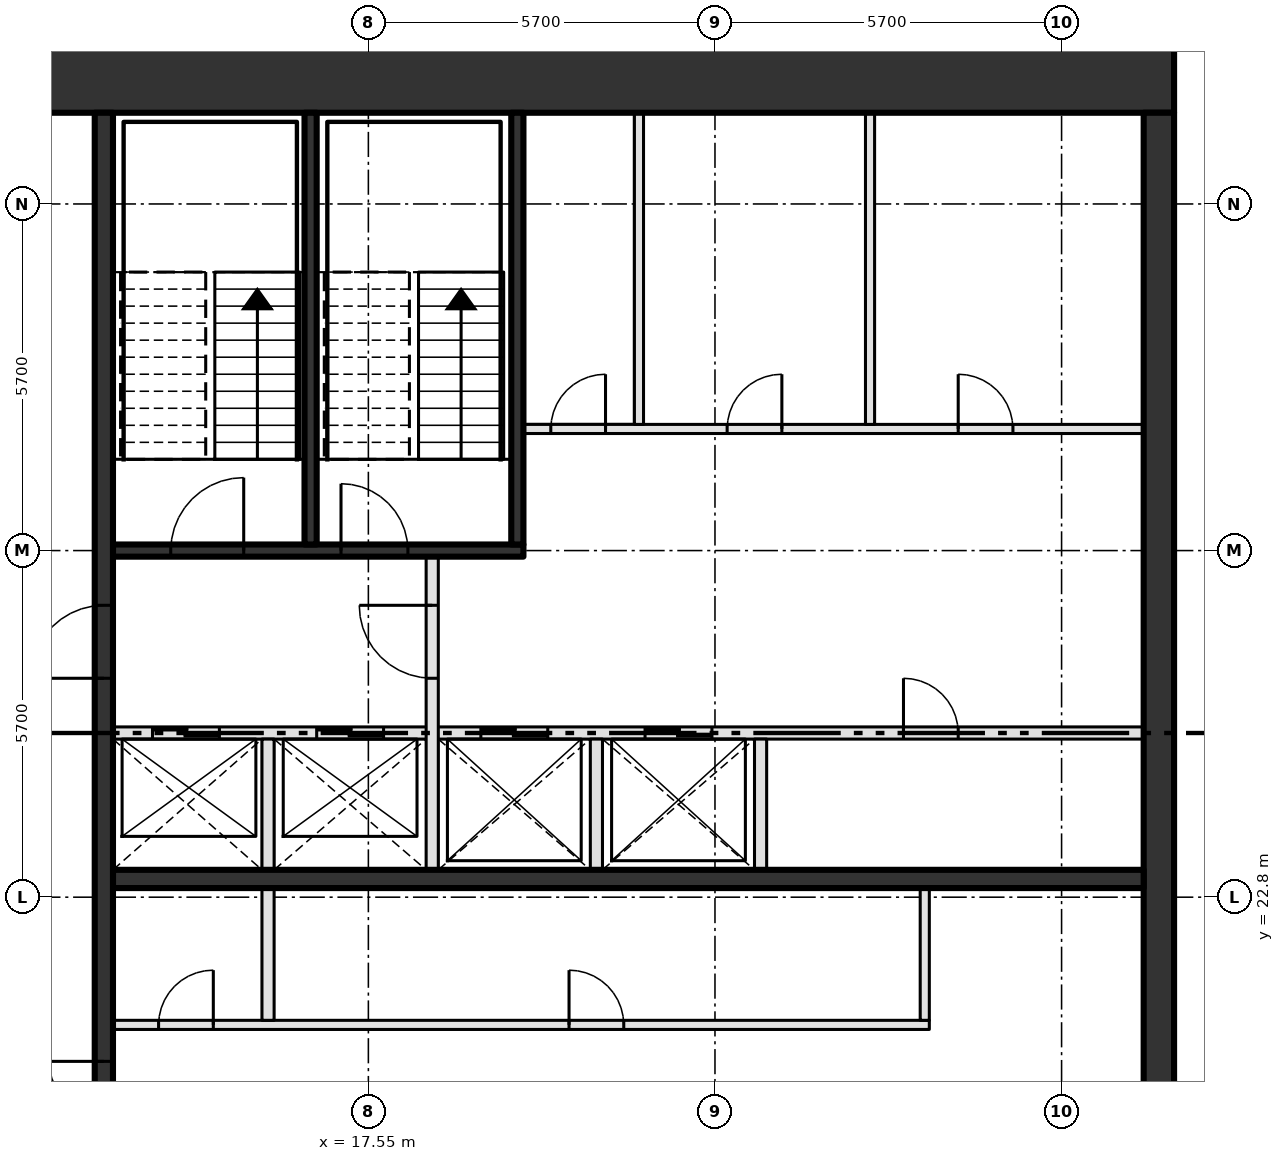
"""IFC4 building model, lengths in metres.
Left out: names, types, materials, properties, quantities, classifications, styles, units other than length and angle.
Written with IfcOpenShell. Run it as: python <this file> out.ifc"""

import sys

from ifc_helpers import new_model, si_unit, direction, frame, frame_2d, origin, place, context, subcontext, project, spatial, rectangle, extrude, element, fill, save


model = new_model("IFC4")
c1 = context("Model", 3, precision=1e-05, world=origin(), true_north=direction((0.0, 1.0)))
c2 = subcontext(c1, "Body", "Model", "MODEL_VIEW")
j1 = project(units=[si_unit("LENGTHUNIT", "METRE"), si_unit("PLANEANGLEUNIT", "RADIAN")], contexts=[c1])
p1 = place(None, origin())
s1 = spatial("IfcSite", under=j1, at=p1, CompositionType="ELEMENT")
p2 = place(p1, origin())
s2 = spatial("IfcBuilding", under=s1, at=p2, CompositionType="ELEMENT")
p3 = place(p2, frame((0.0, 0.0, 396.0)))
s3 = spatial("IfcBuildingStorey", under=s2, at=p3, CompositionType="ELEMENT", Elevation=396.0)
p4 = place(p3, frame((8.0, 36.3, -0.3), z_axis=(0.0, 0.0, 1.0), x_axis=(1.0, 0.0, 0.0)))
e1 = element("IfcWall", 1, at=p4, inside=s3, PredefinedType="SHEAR", context=c2, shape_type="SweptSolid", body=[
    extrude(rectangle(XDim=22.8, YDim=1.2, at=frame_2d((11.4, 0.0))), origin(), (0.0, 0.0, 1.0), 4.05),
])
p5 = place(p4, frame((2.3, 0.0, 0.3)))
e2 = element("IfcOpeningElement", 2, at=p5, cuts=e1, PredefinedType="OPENING", context=c2, shape_type="SweptSolid", body=[
    extrude(rectangle(XDim=1.8, YDim=2.1, at=frame_2d((0.9, 1.05))), frame((0.0, 0.61, 0.0), z_axis=(0.0, -1.0, 0.0), x_axis=(1.0, 0.0, 0.0)), (0.0, 0.0, 1.0), 1.22),
])
p6 = place(p3, frame((30.55, 14.6, -0.3), z_axis=(0.0, 0.0, 1.0), x_axis=(0.0, 1.0, 0.0)))
e3 = element("IfcWall", 3, at=p6, inside=s3, PredefinedType="SHEAR", context=c2, shape_type="SweptSolid", body=[
    extrude(rectangle(XDim=21.1, YDim=0.5, at=frame_2d((10.55, 0.0))), origin(), (0.0, 0.0, 1.0), 4.05),
])
p7 = place(p3, frame((13.35, 20.7, 0.0), z_axis=(0.0, 0.0, 1.0), x_axis=(1.0, 0.0, 0.0)))
e4 = element("IfcWall", 4, at=p7, inside=s3, PredefinedType="PARTITIONING", context=c2, shape_type="SweptSolid", body=[
    extrude(rectangle(XDim=13.425, YDim=0.15, at=frame_2d((6.712, 0.0))), origin(), (0.0, 0.0, 1.0), 3.75),
])
p8 = place(p7, frame((0.75, 0.0, 0.0)))
e5 = element("IfcOpeningElement", 5, at=p8, cuts=e4, PredefinedType="OPENING", context=c2, shape_type="SweptSolid", body=[
    extrude(rectangle(XDim=0.9, YDim=2.1, at=frame_2d((0.45, 1.05))), frame((0.0, 0.085, 0.0), z_axis=(0.0, -1.0, 0.0), x_axis=(1.0, 0.0, 0.0)), (0.0, 0.0, 1.0), 0.17),
])
p9 = place(p7, frame((7.5, 0.0, 0.0)))
e6 = element("IfcOpeningElement", 6, at=p9, cuts=e4, PredefinedType="OPENING", context=c2, shape_type="SweptSolid", body=[
    extrude(rectangle(XDim=0.9, YDim=2.1, at=frame_2d((0.45, 1.05))), frame((0.0, 0.085, 0.0), z_axis=(0.0, -1.0, 0.0), x_axis=(1.0, 0.0, 0.0)), (0.0, 0.0, 1.0), 0.17),
])
p10 = place(p3, frame((13.35, 23.1, 0.0), z_axis=(0.0, 0.0, 1.0), x_axis=(1.0, 0.0, 0.0)))
e7 = element("IfcWall", 7, at=p10, inside=s3, PredefinedType="SHEAR", context=c2, shape_type="SweptSolid", body=[
    extrude(rectangle(XDim=16.95, YDim=0.3, at=frame_2d((8.475, 0.0))), origin(), (0.0, 0.0, 1.0), 3.75),
])
p11 = place(p3, frame((13.35, 25.5, 0.0), z_axis=(0.0, 0.0, 1.0), x_axis=(1.0, 0.0, 0.0)))
e8 = element("IfcWall", 8, at=p11, inside=s3, PredefinedType="SOLIDWALL", context=c2, shape_type="SweptSolid", body=[
    extrude(rectangle(XDim=16.95, YDim=0.2, at=frame_2d((8.475, 0.0))), origin(), (0.0, 0.0, 1.0), 3.75),
])
p12 = place(p11, frame((0.65, 0.0, 0.0)))
e9 = element("IfcOpeningElement", 9, at=p12, cuts=e8, PredefinedType="OPENING", context=c2, shape_type="SweptSolid", body=[
    extrude(rectangle(XDim=1.1, YDim=2.1, at=frame_2d((0.55, 1.05))), frame((0.0, 0.11, 0.0), z_axis=(0.0, -1.0, 0.0), x_axis=(1.0, 0.0, 0.0)), (0.0, 0.0, 1.0), 0.22),
])
p13 = place(p11, frame((3.35, 0.0, 0.0)))
e10 = element("IfcOpeningElement", 10, at=p13, cuts=e8, PredefinedType="OPENING", context=c2, shape_type="SweptSolid", body=[
    extrude(rectangle(XDim=1.1, YDim=2.1, at=frame_2d((0.55, 1.05))), frame((0.0, 0.11, 0.0), z_axis=(0.0, -1.0, 0.0), x_axis=(1.0, 0.0, 0.0)), (0.0, 0.0, 1.0), 0.22),
])
p14 = place(p11, frame((6.05, 0.0, 0.0)))
e11 = element("IfcOpeningElement", 11, at=p14, cuts=e8, PredefinedType="OPENING", context=c2, shape_type="SweptSolid", body=[
    extrude(rectangle(XDim=1.1, YDim=2.1, at=frame_2d((0.55, 1.05))), frame((0.0, 0.11, 0.0), z_axis=(0.0, -1.0, 0.0), x_axis=(1.0, 0.0, 0.0)), (0.0, 0.0, 1.0), 0.22),
])
p15 = place(p11, frame((8.75, 0.0, 0.0)))
e12 = element("IfcOpeningElement", 12, at=p15, cuts=e8, PredefinedType="OPENING", context=c2, shape_type="SweptSolid", body=[
    extrude(rectangle(XDim=1.1, YDim=2.1, at=frame_2d((0.55, 1.05))), frame((0.0, 0.11, 0.0), z_axis=(0.0, -1.0, 0.0), x_axis=(1.0, 0.0, 0.0)), (0.0, 0.0, 1.0), 0.22),
])
p16 = place(p11, frame((13.0, 0.0, 0.0)))
e13 = element("IfcOpeningElement", 13, at=p16, cuts=e8, PredefinedType="OPENING", context=c2, shape_type="SweptSolid", body=[
    extrude(rectangle(XDim=0.9, YDim=2.1, at=frame_2d((0.45, 1.05))), frame((0.0, 0.11, 0.0), z_axis=(0.0, -1.0, 0.0), x_axis=(1.0, 0.0, 0.0)), (0.0, 0.0, 1.0), 0.22),
])
p17 = place(p3, frame((13.35, 28.5, 0.0), z_axis=(0.0, 0.0, 1.0), x_axis=(1.0, 0.0, 0.0)))
e14 = element("IfcWall", 14, at=p17, inside=s3, PredefinedType="SOLIDWALL", context=c2, shape_type="SweptSolid", body=[
    extrude(rectangle(XDim=6.75, YDim=0.2, at=frame_2d((3.375, 0.0))), origin(), (0.0, 0.0, 1.0), 3.75),
])
p18 = place(p17, frame((0.95, 0.0, 0.0)))
e15 = element("IfcOpeningElement", 15, at=p18, cuts=e14, PredefinedType="OPENING", context=c2, shape_type="SweptSolid", body=[
    extrude(rectangle(XDim=1.2, YDim=2.1, at=frame_2d((0.6, 1.05))), frame((0.0, 0.11, 0.0), z_axis=(0.0, -1.0, 0.0), x_axis=(1.0, 0.0, 0.0)), (0.0, 0.0, 1.0), 0.22),
])
p19 = place(p17, frame((3.75, 0.0, 0.0)))
e16 = element("IfcOpeningElement", 16, at=p19, cuts=e14, PredefinedType="OPENING", context=c2, shape_type="SweptSolid", body=[
    extrude(rectangle(XDim=1.1, YDim=2.1, at=frame_2d((0.55, 1.05))), frame((0.0, 0.11, 0.0), z_axis=(0.0, -1.0, 0.0), x_axis=(1.0, 0.0, 0.0)), (0.0, 0.0, 1.0), 0.22),
])
p20 = place(p3, frame((20.1, 30.5, 0.0), z_axis=(0.0, 0.0, 1.0), x_axis=(1.0, 0.0, 0.0)))
e17 = element("IfcWall", 17, at=p20, inside=s3, PredefinedType="PARTITIONING", context=c2, shape_type="SweptSolid", body=[
    extrude(rectangle(XDim=10.2, YDim=0.15, at=frame_2d((5.1, 0.0))), origin(), (0.0, 0.0, 1.0), 3.75),
])
p21 = place(p20, frame((0.45, 0.0, 0.0)))
e18 = element("IfcOpeningElement", 18, at=p21, cuts=e17, PredefinedType="OPENING", context=c2, shape_type="SweptSolid", body=[
    extrude(rectangle(XDim=0.9, YDim=2.1, at=frame_2d((0.45, 1.05))), frame((0.0, 0.085, 0.0), z_axis=(0.0, -1.0, 0.0), x_axis=(1.0, 0.0, 0.0)), (0.0, 0.0, 1.0), 0.17),
])
p22 = place(p20, frame((3.35, 0.0, 0.0)))
e19 = element("IfcOpeningElement", 19, at=p22, cuts=e17, PredefinedType="OPENING", context=c2, shape_type="SweptSolid", body=[
    extrude(rectangle(XDim=0.9, YDim=2.1, at=frame_2d((0.45, 1.05))), frame((0.0, 0.085, 0.0), z_axis=(0.0, -1.0, 0.0), x_axis=(1.0, 0.0, 0.0)), (0.0, 0.0, 1.0), 0.17),
])
p23 = place(p20, frame((7.15, 0.0, 0.0)))
e20 = element("IfcOpeningElement", 20, at=p23, cuts=e17, PredefinedType="OPENING", context=c2, shape_type="SweptSolid", body=[
    extrude(rectangle(XDim=0.9, YDim=2.1, at=frame_2d((0.45, 1.05))), frame((0.0, 0.085, 0.0), z_axis=(0.0, -1.0, 0.0), x_axis=(1.0, 0.0, 0.0)), (0.0, 0.0, 1.0), 0.17),
])
p24 = place(p3, frame((13.2, 14.6, 0.0), z_axis=(0.0, 0.0, 1.0), x_axis=(0.0, 1.0, 0.0)))
e21 = element("IfcWall", 21, at=p24, inside=s3, PredefinedType="SHEAR", context=c2, shape_type="SweptSolid", body=[
    extrude(rectangle(XDim=21.1, YDim=0.3, at=frame_2d((10.55, 0.0))), origin(), (0.0, 0.0, 1.0), 3.75),
])
p25 = place(p24, frame((3.7, 0.0, 0.0)))
e22 = element("IfcOpeningElement", 22, at=p25, cuts=e21, PredefinedType="OPENING", context=c2, shape_type="SweptSolid", body=[
    extrude(rectangle(XDim=1.8, YDim=2.1, at=frame_2d((0.9, 1.05))), frame((0.0, 0.16, 0.0), z_axis=(0.0, -1.0, 0.0), x_axis=(1.0, 0.0, 0.0)), (0.0, 0.0, 1.0), 0.32),
])
p26 = place(p24, frame((11.8, 0.0, 0.0)))
e23 = element("IfcOpeningElement", 23, at=p26, cuts=e21, PredefinedType="OPENING", context=c2, shape_type="SweptSolid", body=[
    extrude(rectangle(XDim=1.2, YDim=2.1, at=frame_2d((0.6, 1.05))), frame((0.0, 0.16, 0.0), z_axis=(0.0, -1.0, 0.0), x_axis=(1.0, 0.0, 0.0)), (0.0, 0.0, 1.0), 0.32),
])
p27 = place(p3, frame((15.9, 20.775, 0.0), z_axis=(0.0, 0.0, 1.0), x_axis=(0.0, 1.0, 0.0)))
e24 = element("IfcWall", 24, at=p27, inside=s3, PredefinedType="SOLIDWALL", context=c2, shape_type="SweptSolid", body=[
    extrude(rectangle(XDim=4.625, YDim=0.2, at=frame_2d((2.312, 0.0))), origin(), (0.0, 0.0, 1.0), 3.75),
])
p28 = place(p3, frame((16.6, 28.6, 0.0), z_axis=(0.0, 0.0, 1.0), x_axis=(0.0, 1.0, 0.0)))
e25 = element("IfcWall", 25, at=p28, inside=s3, PredefinedType="SOLIDWALL", context=c2, shape_type="SweptSolid", body=[
    extrude(rectangle(XDim=7.1, YDim=0.2, at=frame_2d((3.55, 0.0))), origin(), (0.0, 0.0, 1.0), 3.75),
])
p29 = place(p3, frame((18.6, 23.25, 0.0), z_axis=(0.0, 0.0, 1.0), x_axis=(0.0, 1.0, 0.0)))
e26 = element("IfcWall", 26, at=p29, inside=s3, PredefinedType="SOLIDWALL", context=c2, shape_type="SweptSolid", body=[
    extrude(rectangle(XDim=5.15, YDim=0.2, at=frame_2d((2.575, 0.0))), origin(), (0.0, 0.0, 1.0), 3.75),
])
p30 = place(p29, frame((3.15, 0.0, 0.0)))
e27 = element("IfcOpeningElement", 27, at=p30, cuts=e26, PredefinedType="OPENING", context=c2, shape_type="SweptSolid", body=[
    extrude(rectangle(XDim=1.2, YDim=2.1, at=frame_2d((0.6, 1.05))), frame((0.0, 0.11, 0.0), z_axis=(0.0, -1.0, 0.0), x_axis=(1.0, 0.0, 0.0)), (0.0, 0.0, 1.0), 0.22),
])
p31 = place(p3, frame((20.0, 28.6, 0.0), z_axis=(0.0, 0.0, 1.0), x_axis=(0.0, 1.0, 0.0)))
e28 = element("IfcWall", 28, at=p31, inside=s3, PredefinedType="SOLIDWALL", context=c2, shape_type="SweptSolid", body=[
    extrude(rectangle(XDim=7.1, YDim=0.2, at=frame_2d((3.55, 0.0))), origin(), (0.0, 0.0, 1.0), 3.75),
])
p32 = place(p3, frame((21.3, 23.25, 0.0), z_axis=(0.0, 0.0, 1.0), x_axis=(0.0, 1.0, 0.0)))
e29 = element("IfcWall", 29, at=p32, inside=s3, PredefinedType="SOLIDWALL", context=c2, shape_type="SweptSolid", body=[
    extrude(rectangle(XDim=2.15, YDim=0.2, at=frame_2d((1.075, 0.0))), origin(), (0.0, 0.0, 1.0), 3.75),
])
p33 = place(p3, frame((22.0, 30.575, 0.0), z_axis=(0.0, 0.0, 1.0), x_axis=(0.0, 1.0, 0.0)))
e30 = element("IfcWall", 30, at=p33, inside=s3, PredefinedType="PARTITIONING", context=c2, shape_type="SweptSolid", body=[
    extrude(rectangle(XDim=5.125, YDim=0.15, at=frame_2d((2.562, 0.0))), origin(), (0.0, 0.0, 1.0), 3.75),
])
p34 = place(p3, frame((24.0, 23.25, 0.0), z_axis=(0.0, 0.0, 1.0), x_axis=(0.0, 1.0, 0.0)))
e31 = element("IfcWall", 31, at=p34, inside=s3, PredefinedType="SOLIDWALL", context=c2, shape_type="SweptSolid", body=[
    extrude(rectangle(XDim=2.15, YDim=0.2, at=frame_2d((1.075, 0.0))), origin(), (0.0, 0.0, 1.0), 3.75),
])
p35 = place(p3, frame((25.8, 30.575, 0.0), z_axis=(0.0, 0.0, 1.0), x_axis=(0.0, 1.0, 0.0)))
e32 = element("IfcWall", 32, at=p35, inside=s3, PredefinedType="PARTITIONING", context=c2, shape_type="SweptSolid", body=[
    extrude(rectangle(XDim=5.125, YDim=0.15, at=frame_2d((2.562, 0.0))), origin(), (0.0, 0.0, 1.0), 3.75),
])
p36 = place(p3, frame((26.7, 20.775, 0.0), z_axis=(0.0, 0.0, 1.0), x_axis=(0.0, 1.0, 0.0)))
e33 = element("IfcWall", 33, at=p36, inside=s3, PredefinedType="PARTITIONING", context=c2, shape_type="SweptSolid", body=[
    extrude(rectangle(XDim=2.175, YDim=0.15, at=frame_2d((1.087, 0.0))), origin(), (0.0, 0.0, 1.0), 3.75),
])
p37 = place(p12, origin())
e34 = element("IfcDoor", 34, at=p37, inside=s3, OperationType="SLIDING_TO_LEFT", PredefinedType="DOOR", context=c2, shape_type="SweptSolid", body=[
    extrude(rectangle(XDim=1.1, YDim=2.1, at=frame_2d((0.55, 1.05))), frame((0.0, 0.025, 0.0), z_axis=(0.0, -1.0, 0.0), x_axis=(1.0, 0.0, 0.0)), (0.0, 0.0, 1.0), 0.05),
])
fill(e9, e34)
p38 = place(p13, origin())
e35 = element("IfcDoor", 35, at=p38, inside=s3, OperationType="SLIDING_TO_LEFT", PredefinedType="DOOR", context=c2, shape_type="SweptSolid", body=[
    extrude(rectangle(XDim=1.1, YDim=2.1, at=frame_2d((0.55, 1.05))), frame((0.0, 0.025, 0.0), z_axis=(0.0, -1.0, 0.0), x_axis=(1.0, 0.0, 0.0)), (0.0, 0.0, 1.0), 0.05),
])
fill(e10, e35)
p39 = place(p14, origin())
e36 = element("IfcDoor", 36, at=p39, inside=s3, OperationType="SLIDING_TO_LEFT", PredefinedType="DOOR", context=c2, shape_type="SweptSolid", body=[
    extrude(rectangle(XDim=1.1, YDim=2.1, at=frame_2d((0.55, 1.05))), frame((0.0, 0.025, 0.0), z_axis=(0.0, -1.0, 0.0), x_axis=(1.0, 0.0, 0.0)), (0.0, 0.0, 1.0), 0.05),
])
fill(e11, e36)
p40 = place(p15, origin())
e37 = element("IfcDoor", 37, at=p40, inside=s3, OperationType="SLIDING_TO_LEFT", PredefinedType="DOOR", context=c2, shape_type="SweptSolid", body=[
    extrude(rectangle(XDim=1.1, YDim=2.1, at=frame_2d((0.55, 1.05))), frame((0.0, 0.025, 0.0), z_axis=(0.0, -1.0, 0.0), x_axis=(1.0, 0.0, 0.0)), (0.0, 0.0, 1.0), 0.05),
])
fill(e12, e37)
p41 = place(p8, origin())
e38 = element("IfcDoor", 38, at=p41, inside=s3, OperationType="SINGLE_SWING_RIGHT", PredefinedType="DOOR", context=c2, shape_type="SweptSolid", body=[
    extrude(rectangle(XDim=0.9, YDim=2.1, at=frame_2d((0.45, 1.05))), frame((0.0, 0.025, 0.0), z_axis=(0.0, -1.0, 0.0), x_axis=(1.0, 0.0, 0.0)), (0.0, 0.0, 1.0), 0.05),
])
fill(e5, e38)
p42 = place(p9, origin())
e39 = element("IfcDoor", 39, at=p42, inside=s3, OperationType="SINGLE_SWING_LEFT", PredefinedType="DOOR", context=c2, shape_type="SweptSolid", body=[
    extrude(rectangle(XDim=0.9, YDim=2.1, at=frame_2d((0.45, 1.05))), frame((0.0, 0.025, 0.0), z_axis=(0.0, -1.0, 0.0), x_axis=(1.0, 0.0, 0.0)), (0.0, 0.0, 1.0), 0.05),
])
fill(e6, e39)
p43 = place(p16, origin())
e40 = element("IfcDoor", 40, at=p43, inside=s3, OperationType="SINGLE_SWING_LEFT", PredefinedType="DOOR", context=c2, shape_type="SweptSolid", body=[
    extrude(rectangle(XDim=0.9, YDim=2.1, at=frame_2d((0.45, 1.05))), frame((0.0, 0.025, 0.0), z_axis=(0.0, -1.0, 0.0), x_axis=(1.0, 0.0, 0.0)), (0.0, 0.0, 1.0), 0.05),
])
fill(e13, e40)
p44 = place(p21, origin())
e41 = element("IfcDoor", 41, at=p44, inside=s3, OperationType="SINGLE_SWING_RIGHT", PredefinedType="DOOR", context=c2, shape_type="SweptSolid", body=[
    extrude(rectangle(XDim=0.9, YDim=2.1, at=frame_2d((0.45, 1.05))), frame((0.0, 0.025, 0.0), z_axis=(0.0, -1.0, 0.0), x_axis=(1.0, 0.0, 0.0)), (0.0, 0.0, 1.0), 0.05),
])
fill(e18, e41)
p45 = place(p22, origin())
e42 = element("IfcDoor", 42, at=p45, inside=s3, OperationType="SINGLE_SWING_RIGHT", PredefinedType="DOOR", context=c2, shape_type="SweptSolid", body=[
    extrude(rectangle(XDim=0.9, YDim=2.1, at=frame_2d((0.45, 1.05))), frame((0.0, 0.025, 0.0), z_axis=(0.0, -1.0, 0.0), x_axis=(1.0, 0.0, 0.0)), (0.0, 0.0, 1.0), 0.05),
])
fill(e19, e42)
p46 = place(p23, origin())
e43 = element("IfcDoor", 43, at=p46, inside=s3, OperationType="SINGLE_SWING_LEFT", PredefinedType="DOOR", context=c2, shape_type="SweptSolid", body=[
    extrude(rectangle(XDim=0.9, YDim=2.1, at=frame_2d((0.45, 1.05))), frame((0.0, 0.025, 0.0), z_axis=(0.0, -1.0, 0.0), x_axis=(1.0, 0.0, 0.0)), (0.0, 0.0, 1.0), 0.05),
])
fill(e20, e43)
p47 = place(p18, origin())
e44 = element("IfcDoor", 44, at=p47, inside=s3, OperationType="SINGLE_SWING_RIGHT", PredefinedType="DOOR", context=c2, shape_type="SweptSolid", body=[
    extrude(rectangle(XDim=1.2, YDim=2.1, at=frame_2d((0.6, 1.05))), frame((0.0, 0.025, 0.0), z_axis=(0.0, -1.0, 0.0), x_axis=(1.0, 0.0, 0.0)), (0.0, 0.0, 1.0), 0.05),
])
fill(e15, e44)
p48 = place(p19, origin())
e45 = element("IfcDoor", 45, at=p48, inside=s3, OperationType="SINGLE_SWING_LEFT", PredefinedType="DOOR", context=c2, shape_type="SweptSolid", body=[
    extrude(rectangle(XDim=1.1, YDim=2.1, at=frame_2d((0.55, 1.05))), frame((0.0, 0.025, 0.0), z_axis=(0.0, -1.0, 0.0), x_axis=(1.0, 0.0, 0.0)), (0.0, 0.0, 1.0), 0.05),
])
fill(e16, e45)
p49 = place(p25, origin())
e46 = element("IfcDoor", 46, at=p49, inside=s3, OperationType="DOUBLE_DOOR_SINGLE_SWING", PredefinedType="DOOR", context=c2, shape_type="SweptSolid", body=[
    extrude(rectangle(XDim=1.8, YDim=2.1, at=frame_2d((0.9, 1.05))), frame((0.0, 0.025, 0.0), z_axis=(0.0, -1.0, 0.0), x_axis=(1.0, 0.0, 0.0)), (0.0, 0.0, 1.0), 0.05),
])
fill(e22, e46)
p50 = place(p26, origin())
e47 = element("IfcDoor", 47, at=p50, inside=s3, OperationType="SINGLE_SWING_LEFT", PredefinedType="DOOR", context=c2, shape_type="SweptSolid", body=[
    extrude(rectangle(XDim=1.2, YDim=2.1, at=frame_2d((0.6, 1.05))), frame((0.0, 0.025, 0.0), z_axis=(0.0, -1.0, 0.0), x_axis=(1.0, 0.0, 0.0)), (0.0, 0.0, 1.0), 0.05),
])
fill(e23, e47)
p51 = place(p30, origin())
e48 = element("IfcDoor", 48, at=p51, inside=s3, OperationType="SINGLE_SWING_RIGHT", PredefinedType="DOOR", context=c2, shape_type="SweptSolid", body=[
    extrude(rectangle(XDim=1.2, YDim=2.1, at=frame_2d((0.6, 1.05))), frame((0.0, 0.025, 0.0), z_axis=(0.0, -1.0, 0.0), x_axis=(1.0, 0.0, 0.0)), (0.0, 0.0, 1.0), 0.05),
])
fill(e27, e48)
save(model, sys.argv[1])
